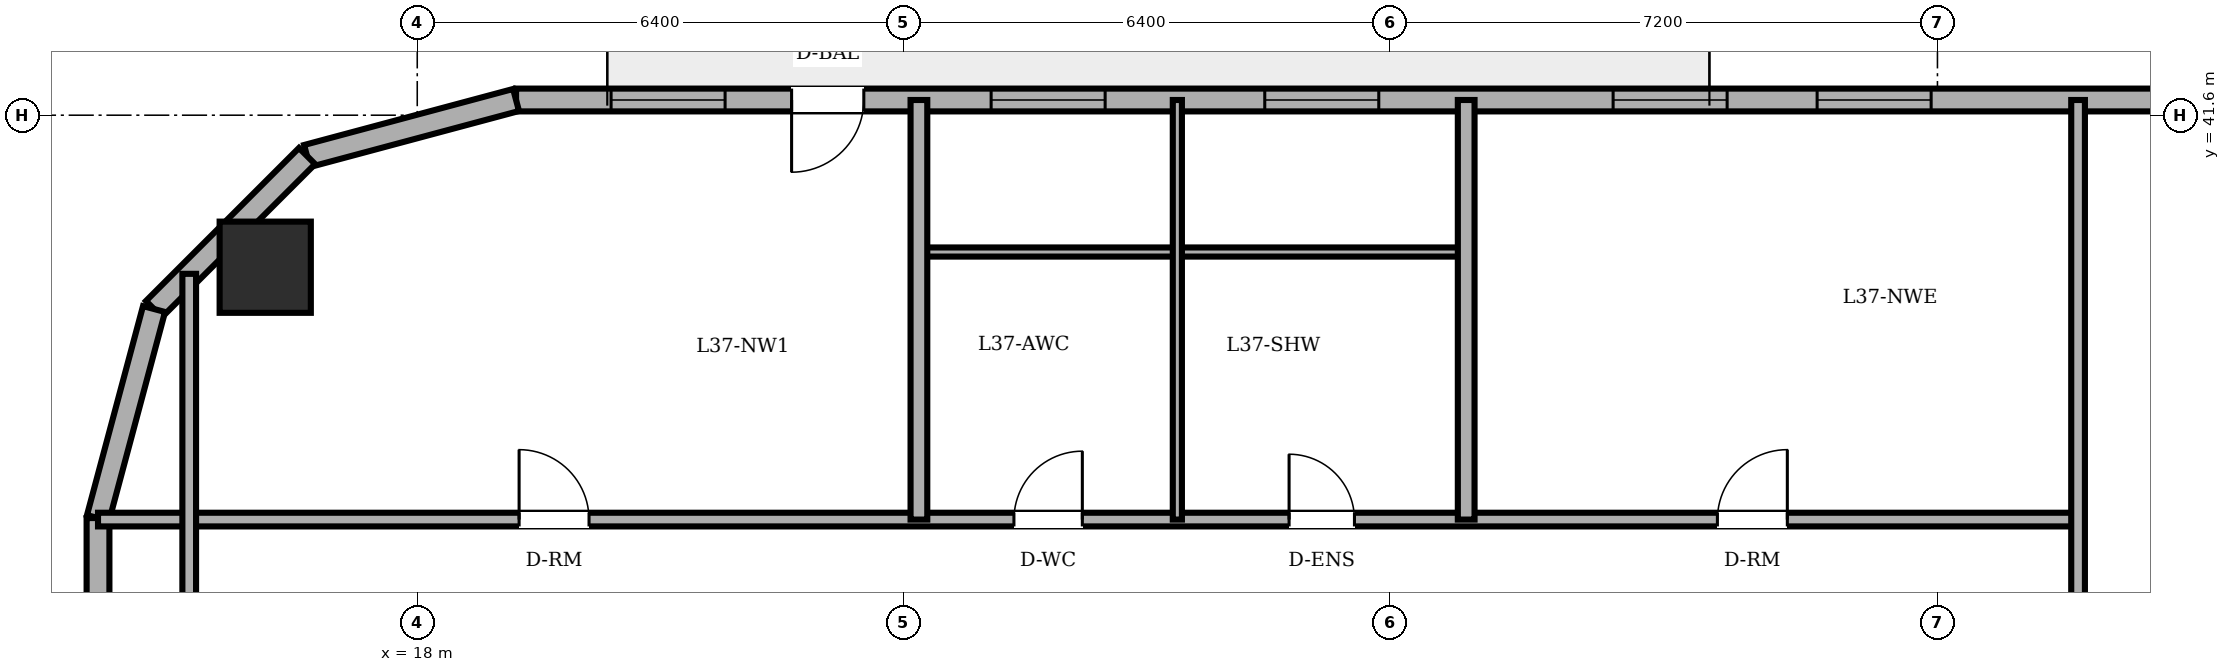
"""IFC4 building model, lengths in metres.
Left out: names, types, materials, properties, quantities, classifications, styles, units other than length and angle.
Written with IfcOpenShell. Run it as: python <this file> out.ifc"""

import sys

from ifc_helpers import new_model, si_unit, direction, frame, frame_2d, origin, origin_2d, place, context, subcontext, project, spatial, rectangle, circle, extrude, element, fill, save


model = new_model("IFC4")
c1 = context("Model", 3, precision=1e-05, world=origin(), true_north=direction((0.0, 1.0)))
c2 = subcontext(c1, "Body", "Model", "MODEL_VIEW")
j1 = project(units=[si_unit("LENGTHUNIT", "METRE"), si_unit("PLANEANGLEUNIT", "RADIAN")], contexts=[c1])
p1 = place(None, origin())
s1 = spatial("IfcSite", under=j1, at=p1, CompositionType="ELEMENT")
p2 = place(p1, origin())
s2 = spatial("IfcBuilding", under=s1, at=p2, CompositionType="ELEMENT")
p3 = place(p2, frame((0.0, 0.0, 143.8)))
s3 = spatial("IfcBuildingStorey", under=s2, at=p3, CompositionType="ELEMENT", Elevation=143.8)
p4 = place(p3, frame((16.0, 39.6, 0.0), z_axis=(0.0, 0.0, 1.0), x_axis=(1.0, 0.0, 0.0)))
e1 = element("IfcColumn", 1, at=p4, inside=s3, PredefinedType="COLUMN", context=c2, shape_type="SweptSolid", body=[
    extrude(circle(Radius=0.6, at=origin_2d()), origin(), (0.0, 0.0, 1.0), 3.6),
])
p5 = place(p3, frame((49.582, 41.8, 0.0), z_axis=(0.0, 0.0, 1.0), x_axis=(-1.0, 0.0, 0.0)))
e2 = element("IfcWall", 2, at=p5, inside=s3, PredefinedType="SOLIDWALL", context=c2, shape_type="SweptSolid", body=[
    extrude(rectangle(XDim=30.282, YDim=0.3, at=frame_2d((15.141, 0.0))), origin(), (0.0, 0.0, 1.0), 3.4),
])
p6 = place(p5, frame((25.707, 0.0, 0.0)))
e3 = element("IfcOpeningElement", 3, at=p6, cuts=e2, PredefinedType="OPENING", context=c2, shape_type="SweptSolid", body=[
    extrude(rectangle(XDim=0.95, YDim=2.2, at=frame_2d((0.475, 1.1))), frame((0.0, 0.16, 0.0), z_axis=(0.0, -1.0, 0.0), x_axis=(1.0, 0.0, 0.0)), (0.0, 0.0, 1.0), 0.32),
])
p7 = place(p5, frame((1.661, 0.0, 0.85)))
e4 = element("IfcOpeningElement", 4, at=p7, cuts=e2, PredefinedType="OPENING", context=c2, shape_type="SweptSolid", body=[
    extrude(rectangle(XDim=1.5, YDim=1.55, at=frame_2d((0.75, 0.775))), frame((0.0, 0.16, 0.0), z_axis=(0.0, -1.0, 0.0), x_axis=(1.0, 0.0, 0.0)), (0.0, 0.0, 1.0), 0.32),
])
p8 = place(p5, frame((5.476, 0.0, 0.85)))
e5 = element("IfcOpeningElement", 5, at=p8, cuts=e2, PredefinedType="OPENING", context=c2, shape_type="SweptSolid", body=[
    extrude(rectangle(XDim=1.5, YDim=1.55, at=frame_2d((0.75, 0.775))), frame((0.0, 0.16, 0.0), z_axis=(0.0, -1.0, 0.0), x_axis=(1.0, 0.0, 0.0)), (0.0, 0.0, 1.0), 0.32),
])
p9 = place(p5, frame((7.229, 0.0, 0.85)))
e6 = element("IfcOpeningElement", 6, at=p9, cuts=e2, PredefinedType="OPENING", context=c2, shape_type="SweptSolid", body=[
    extrude(rectangle(XDim=1.5, YDim=1.55, at=frame_2d((0.75, 0.775))), frame((0.0, 0.16, 0.0), z_axis=(0.0, -1.0, 0.0), x_axis=(1.0, 0.0, 0.0)), (0.0, 0.0, 1.0), 0.32),
])
p10 = place(p5, frame((11.665, 0.0, 0.85)))
e7 = element("IfcOpeningElement", 7, at=p10, cuts=e2, PredefinedType="OPENING", context=c2, shape_type="SweptSolid", body=[
    extrude(rectangle(XDim=1.5, YDim=1.55, at=frame_2d((0.75, 0.775))), frame((0.0, 0.16, 0.0), z_axis=(0.0, -1.0, 0.0), x_axis=(1.0, 0.0, 0.0)), (0.0, 0.0, 1.0), 0.32),
])
p11 = place(p5, frame((14.349, 0.0, 0.85)))
e8 = element("IfcOpeningElement", 8, at=p11, cuts=e2, PredefinedType="OPENING", context=c2, shape_type="SweptSolid", body=[
    extrude(rectangle(XDim=1.5, YDim=1.55, at=frame_2d((0.75, 0.775))), frame((0.0, 0.16, 0.0), z_axis=(0.0, -1.0, 0.0), x_axis=(1.0, 0.0, 0.0)), (0.0, 0.0, 1.0), 0.32),
])
p12 = place(p5, frame((18.932, 0.0, 0.85)))
e9 = element("IfcOpeningElement", 9, at=p12, cuts=e2, PredefinedType="OPENING", context=c2, shape_type="SweptSolid", body=[
    extrude(rectangle(XDim=1.5, YDim=1.55, at=frame_2d((0.75, 0.775))), frame((0.0, 0.16, 0.0), z_axis=(0.0, -1.0, 0.0), x_axis=(1.0, 0.0, 0.0)), (0.0, 0.0, 1.0), 0.32),
])
p13 = place(p5, frame((22.532, 0.0, 0.85)))
e10 = element("IfcOpeningElement", 10, at=p13, cuts=e2, PredefinedType="OPENING", context=c2, shape_type="SweptSolid", body=[
    extrude(rectangle(XDim=1.5, YDim=1.55, at=frame_2d((0.75, 0.775))), frame((0.0, 0.16, 0.0), z_axis=(0.0, -1.0, 0.0), x_axis=(1.0, 0.0, 0.0)), (0.0, 0.0, 1.0), 0.32),
])
p14 = place(p5, frame((27.532, 0.0, 0.85)))
e11 = element("IfcOpeningElement", 11, at=p14, cuts=e2, PredefinedType="OPENING", context=c2, shape_type="SweptSolid", body=[
    extrude(rectangle(XDim=1.5, YDim=1.55, at=frame_2d((0.75, 0.775))), frame((0.0, 0.16, 0.0), z_axis=(0.0, -1.0, 0.0), x_axis=(1.0, 0.0, 0.0)), (0.0, 0.0, 1.0), 0.32),
])
p15 = place(p3, frame((19.3, 41.8, 0.0), z_axis=(0.0, 0.0, 1.0), x_axis=(-0.965908238586, -0.258884674387, 0.0)))
e12 = element("IfcWall", 12, at=p15, inside=s3, PredefinedType="SOLIDWALL", context=c2, shape_type="SweptSolid", body=[
    extrude(rectangle(XDim=2.847, YDim=0.3, at=frame_2d((1.424, 0.0))), origin(), (0.0, 0.0, 1.0), 3.4),
])
p16 = place(p3, frame((16.55, 41.063, 0.0), z_axis=(0.0, 0.0, 1.0), x_axis=(-0.707106781187, -0.707106781187, 0.0)))
e13 = element("IfcWall", 13, at=p16, inside=s3, PredefinedType="SOLIDWALL", context=c2, shape_type="SweptSolid", body=[
    extrude(rectangle(XDim=2.847, YDim=0.3, at=frame_2d((1.423, 0.0))), origin(), (0.0, 0.0, 1.0), 3.4),
])
p17 = place(p3, frame((14.537, 39.05, 0.0), z_axis=(0.0, 0.0, 1.0), x_axis=(-0.258884674387, -0.965908238586, 0.0)))
e14 = element("IfcWall", 14, at=p17, inside=s3, PredefinedType="SOLIDWALL", context=c2, shape_type="SweptSolid", body=[
    extrude(rectangle(XDim=2.847, YDim=0.3, at=frame_2d((1.424, 0.0))), origin(), (0.0, 0.0, 1.0), 3.4),
])
p18 = place(p3, frame((13.8, 36.3, 0.0), z_axis=(0.0, 0.0, 1.0), x_axis=(0.0, -1.0, 0.0)))
e15 = element("IfcWall", 15, at=p18, inside=s3, PredefinedType="SOLIDWALL", context=c2, shape_type="SweptSolid", body=[
    extrude(rectangle(XDim=24.6, YDim=0.3, at=frame_2d((12.3, 0.0))), origin(), (0.0, 0.0, 1.0), 3.4),
])
p19 = place(p18, frame((5.003, 0.0, 0.85)))
e16 = element("IfcOpeningElement", 16, at=p19, cuts=e15, PredefinedType="OPENING", context=c2, shape_type="SweptSolid", body=[
    extrude(rectangle(XDim=1.5, YDim=1.55, at=frame_2d((0.75, 0.775))), frame((0.0, 0.16, 0.0), z_axis=(0.0, -1.0, 0.0), x_axis=(1.0, 0.0, 0.0)), (0.0, 0.0, 1.0), 0.32),
])
p20 = place(p18, frame((8.277, 0.0, 0.85)))
e17 = element("IfcOpeningElement", 17, at=p20, cuts=e15, PredefinedType="OPENING", context=c2, shape_type="SweptSolid", body=[
    extrude(rectangle(XDim=1.5, YDim=1.55, at=frame_2d((0.75, 0.775))), frame((0.0, 0.16, 0.0), z_axis=(0.0, -1.0, 0.0), x_axis=(1.0, 0.0, 0.0)), (0.0, 0.0, 1.0), 0.32),
])
p21 = place(p18, frame((14.823, 0.0, 0.85)))
e18 = element("IfcOpeningElement", 18, at=p21, cuts=e15, PredefinedType="OPENING", context=c2, shape_type="SweptSolid", body=[
    extrude(rectangle(XDim=1.5, YDim=1.55, at=frame_2d((0.75, 0.775))), frame((0.0, 0.16, 0.0), z_axis=(0.0, -1.0, 0.0), x_axis=(1.0, 0.0, 0.0)), (0.0, 0.0, 1.0), 0.32),
])
p22 = place(p18, frame((18.097, 0.0, 0.85)))
e19 = element("IfcOpeningElement", 19, at=p22, cuts=e15, PredefinedType="OPENING", context=c2, shape_type="SweptSolid", body=[
    extrude(rectangle(XDim=1.5, YDim=1.55, at=frame_2d((0.75, 0.775))), frame((0.0, 0.16, 0.0), z_axis=(0.0, -1.0, 0.0), x_axis=(1.0, 0.0, 0.0)), (0.0, 0.0, 1.0), 0.32),
])
p23 = place(p3, frame((13.8, 36.28, 0.0), z_axis=(0.0, 0.0, 1.0), x_axis=(1.0, 0.0, 0.0)))
e20 = element("IfcWall", 20, at=p23, inside=s3, PredefinedType="PARTITIONING", context=c2, shape_type="SweptSolid", body=[
    extrude(rectangle(XDim=26.05, YDim=0.18, at=frame_2d((13.025, 0.0))), origin(), (0.0, 0.0, 1.0), 3.4),
])
p24 = place(p23, frame((12.05, 0.0, 0.0)))
e21 = element("IfcOpeningElement", 21, at=p24, cuts=e20, PredefinedType="OPENING", context=c2, shape_type="SweptSolid", body=[
    extrude(rectangle(XDim=0.9, YDim=2.1, at=frame_2d((0.45, 1.05))), frame((0.0, 0.1, 0.0), z_axis=(0.0, -1.0, 0.0), x_axis=(1.0, 0.0, 0.0)), (0.0, 0.0, 1.0), 0.2),
])
p25 = place(p23, frame((15.67, 0.0, 0.0)))
e22 = element("IfcOpeningElement", 22, at=p25, cuts=e20, PredefinedType="OPENING", context=c2, shape_type="SweptSolid", body=[
    extrude(rectangle(XDim=0.86, YDim=2.1, at=frame_2d((0.43, 1.05))), frame((0.0, 0.1, 0.0), z_axis=(0.0, -1.0, 0.0), x_axis=(1.0, 0.0, 0.0)), (0.0, 0.0, 1.0), 0.2),
])
p26 = place(p23, frame((5.54, 0.0, 0.0)))
e23 = element("IfcOpeningElement", 23, at=p26, cuts=e20, PredefinedType="OPENING", context=c2, shape_type="SweptSolid", body=[
    extrude(rectangle(XDim=0.92, YDim=2.1, at=frame_2d((0.46, 1.05))), frame((0.0, 0.1, 0.0), z_axis=(0.0, -1.0, 0.0), x_axis=(1.0, 0.0, 0.0)), (0.0, 0.0, 1.0), 0.2),
])
p27 = place(p23, frame((21.305, 0.0, 0.0)))
e24 = element("IfcOpeningElement", 24, at=p27, cuts=e20, PredefinedType="OPENING", context=c2, shape_type="SweptSolid", body=[
    extrude(rectangle(XDim=0.92, YDim=2.1, at=frame_2d((0.46, 1.05))), frame((0.0, 0.1, 0.0), z_axis=(0.0, -1.0, 0.0), x_axis=(1.0, 0.0, 0.0)), (0.0, 0.0, 1.0), 0.2),
])
p28 = place(p3, frame((24.6, 39.8, 0.0), z_axis=(0.0, 0.0, 1.0), x_axis=(1.0, 0.0, 0.0)))
e25 = element("IfcWall", 25, at=p28, inside=s3, PredefinedType="PARTITIONING", context=c2, shape_type="SweptSolid", body=[
    extrude(rectangle(XDim=7.2, YDim=0.12, at=frame_2d((3.6, 0.0))), origin(), (0.0, 0.0, 1.0), 2.882),
])
p29 = place(p3, frame((15.0, 33.82, 0.0), z_axis=(0.0, 0.0, 1.0), x_axis=(0.0, 1.0, 0.0)))
e26 = element("IfcWall", 26, at=p29, inside=s3, PredefinedType="PARTITIONING", context=c2, shape_type="SweptSolid", body=[
    extrude(rectangle(XDim=5.693, YDim=0.18, at=frame_2d((2.846, 0.0))), origin(), (0.0, 0.0, 1.0), 3.4),
])
p30 = place(p3, frame((24.6, 36.28, 0.0), z_axis=(0.0, 0.0, 1.0), x_axis=(0.0, 1.0, 0.0)))
e27 = element("IfcWall", 27, at=p30, inside=s3, PredefinedType="PARTITIONING", context=c2, shape_type="SweptSolid", body=[
    extrude(rectangle(XDim=5.52, YDim=0.22, at=frame_2d((2.76, 0.0))), origin(), (0.0, 0.0, 1.0), 3.4),
])
p31 = place(p3, frame((28.0, 36.28, 0.0), z_axis=(0.0, 0.0, 1.0), x_axis=(0.0, 1.0, 0.0)))
e28 = element("IfcWall", 28, at=p31, inside=s3, PredefinedType="PARTITIONING", context=c2, shape_type="SweptSolid", body=[
    extrude(rectangle(XDim=5.52, YDim=0.12, at=frame_2d((2.76, 0.0))), origin(), (0.0, 0.0, 1.0), 3.4),
])
p32 = place(p3, frame((31.8, 36.28, 0.0), z_axis=(0.0, 0.0, 1.0), x_axis=(0.0, 1.0, 0.0)))
e29 = element("IfcWall", 29, at=p32, inside=s3, PredefinedType="PARTITIONING", context=c2, shape_type="SweptSolid", body=[
    extrude(rectangle(XDim=5.52, YDim=0.22, at=frame_2d((2.76, 0.0))), origin(), (0.0, 0.0, 1.0), 3.4),
])
p33 = place(p3, frame((39.85, 25.18, 0.0), z_axis=(0.0, 0.0, 1.0), x_axis=(0.0, 1.0, 0.0)))
e30 = element("IfcWall", 30, at=p33, inside=s3, PredefinedType="PARTITIONING", context=c2, shape_type="SweptSolid", body=[
    extrude(rectangle(XDim=16.62, YDim=0.18, at=frame_2d((8.31, 0.0))), origin(), (0.0, 0.0, 1.0), 3.4),
])
p34 = place(p33, frame((5.31, 0.0, 0.0)))
e31 = element("IfcOpeningElement", 31, at=p34, cuts=e30, PredefinedType="OPENING", context=c2, shape_type="SweptSolid", body=[
    extrude(rectangle(XDim=1.0, YDim=2.15, at=frame_2d((0.5, 1.075))), frame((0.0, 0.1, 0.0), z_axis=(0.0, -1.0, 0.0), x_axis=(1.0, 0.0, 0.0)), (0.0, 0.0, 1.0), 0.2),
])
p35 = place(p6, origin())
e32 = element("IfcDoor", 32, at=p35, inside=s3, OperationType="SINGLE_SWING_RIGHT", PredefinedType="DOOR", context=c2, shape_type="SweptSolid", body=[
    extrude(rectangle(XDim=0.95, YDim=2.2, at=frame_2d((0.475, 1.1))), frame((0.0, 0.025, 0.0), z_axis=(0.0, -1.0, 0.0), x_axis=(1.0, 0.0, 0.0)), (0.0, 0.0, 1.0), 0.05),
])
fill(e3, e32)
p36 = place(p10, origin())
e33 = element("IfcWindow", 33, at=p36, inside=s3, PartitioningType="DOUBLE_PANEL_VERTICAL", PredefinedType="WINDOW", context=c2, shape_type="SweptSolid", body=[
    extrude(rectangle(XDim=1.5, YDim=1.55, at=frame_2d((0.75, 0.775))), frame((0.0, 0.03, 0.0), z_axis=(0.0, -1.0, 0.0), x_axis=(1.0, 0.0, 0.0)), (0.0, 0.0, 1.0), 0.06),
])
fill(e7, e33)
p37 = place(p11, origin())
e34 = element("IfcWindow", 34, at=p37, inside=s3, PartitioningType="DOUBLE_PANEL_VERTICAL", PredefinedType="WINDOW", context=c2, shape_type="SweptSolid", body=[
    extrude(rectangle(XDim=1.5, YDim=1.55, at=frame_2d((0.75, 0.775))), frame((0.0, 0.03, 0.0), z_axis=(0.0, -1.0, 0.0), x_axis=(1.0, 0.0, 0.0)), (0.0, 0.0, 1.0), 0.06),
])
fill(e8, e34)
p38 = place(p12, origin())
e35 = element("IfcWindow", 35, at=p38, inside=s3, PartitioningType="DOUBLE_PANEL_VERTICAL", PredefinedType="WINDOW", context=c2, shape_type="SweptSolid", body=[
    extrude(rectangle(XDim=1.5, YDim=1.55, at=frame_2d((0.75, 0.775))), frame((0.0, 0.03, 0.0), z_axis=(0.0, -1.0, 0.0), x_axis=(1.0, 0.0, 0.0)), (0.0, 0.0, 1.0), 0.06),
])
fill(e9, e35)
p39 = place(p13, origin())
e36 = element("IfcWindow", 36, at=p39, inside=s3, PartitioningType="DOUBLE_PANEL_VERTICAL", PredefinedType="WINDOW", context=c2, shape_type="SweptSolid", body=[
    extrude(rectangle(XDim=1.5, YDim=1.55, at=frame_2d((0.75, 0.775))), frame((0.0, 0.03, 0.0), z_axis=(0.0, -1.0, 0.0), x_axis=(1.0, 0.0, 0.0)), (0.0, 0.0, 1.0), 0.06),
])
fill(e10, e36)
p40 = place(p14, origin())
e37 = element("IfcWindow", 37, at=p40, inside=s3, PartitioningType="DOUBLE_PANEL_VERTICAL", PredefinedType="WINDOW", context=c2, shape_type="SweptSolid", body=[
    extrude(rectangle(XDim=1.5, YDim=1.55, at=frame_2d((0.75, 0.775))), frame((0.0, 0.03, 0.0), z_axis=(0.0, -1.0, 0.0), x_axis=(1.0, 0.0, 0.0)), (0.0, 0.0, 1.0), 0.06),
])
fill(e11, e37)
p41 = place(p24, origin())
e38 = element("IfcDoor", 38, at=p41, inside=s3, OperationType="SINGLE_SWING_RIGHT", PredefinedType="DOOR", context=c2, shape_type="SweptSolid", body=[
    extrude(rectangle(XDim=0.9, YDim=2.1, at=frame_2d((0.45, 1.05))), frame((0.0, 0.025, 0.0), z_axis=(0.0, -1.0, 0.0), x_axis=(1.0, 0.0, 0.0)), (0.0, 0.0, 1.0), 0.05),
])
fill(e21, e38)
p42 = place(p25, origin())
e39 = element("IfcDoor", 39, at=p42, inside=s3, OperationType="SINGLE_SWING_LEFT", PredefinedType="DOOR", context=c2, shape_type="SweptSolid", body=[
    extrude(rectangle(XDim=0.86, YDim=2.1, at=frame_2d((0.43, 1.05))), frame((0.0, 0.025, 0.0), z_axis=(0.0, -1.0, 0.0), x_axis=(1.0, 0.0, 0.0)), (0.0, 0.0, 1.0), 0.05),
])
fill(e22, e39)
p43 = place(p26, origin())
e40 = element("IfcDoor", 40, at=p43, inside=s3, OperationType="SINGLE_SWING_LEFT", PredefinedType="DOOR", context=c2, shape_type="SweptSolid", body=[
    extrude(rectangle(XDim=0.92, YDim=2.1, at=frame_2d((0.46, 1.05))), frame((0.0, 0.025, 0.0), z_axis=(0.0, -1.0, 0.0), x_axis=(1.0, 0.0, 0.0)), (0.0, 0.0, 1.0), 0.05),
])
fill(e23, e40)
p44 = place(p27, origin())
e41 = element("IfcDoor", 41, at=p44, inside=s3, OperationType="SINGLE_SWING_RIGHT", PredefinedType="DOOR", context=c2, shape_type="SweptSolid", body=[
    extrude(rectangle(XDim=0.92, YDim=2.1, at=frame_2d((0.46, 1.05))), frame((0.0, 0.025, 0.0), z_axis=(0.0, -1.0, 0.0), x_axis=(1.0, 0.0, 0.0)), (0.0, 0.0, 1.0), 0.05),
])
fill(e24, e41)
save(model, sys.argv[1])
